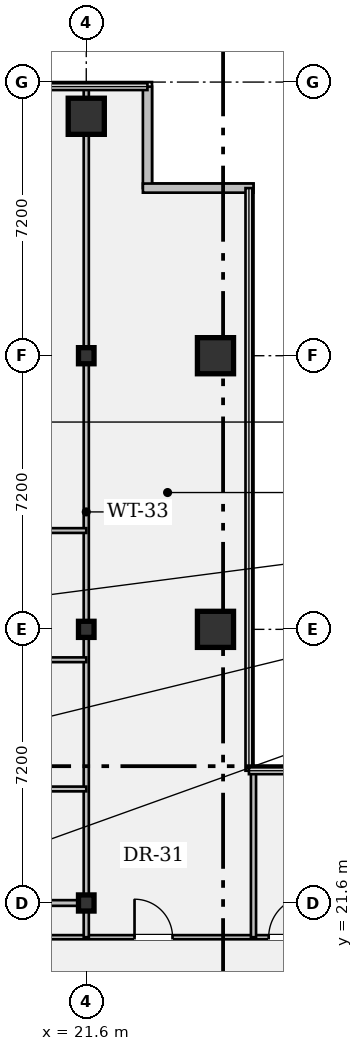
"""IFC4 building model, lengths in metres.
Left out: names, types, materials, properties, quantities, classifications, styles, units other than length and angle.
Written with IfcOpenShell. Run it as: python <this file> out.ifc"""

import sys

from ifc_helpers import new_model, si_unit, direction, frame, frame_2d, origin, origin_2d, place, context, subcontext, project, spatial, rectangle, hollow_rectangle, i_section, extrude, element, fill, save


model = new_model("IFC4")
c1 = context("Model", 3, precision=1e-05, world=origin(), true_north=direction((0.0, 1.0)))
c2 = subcontext(c1, "Body", "Model", "MODEL_VIEW")
j1 = project(units=[si_unit("LENGTHUNIT", "METRE"), si_unit("PLANEANGLEUNIT", "RADIAN")], contexts=[c1])
p1 = place(None, origin())
s1 = spatial("IfcSite", under=j1, at=p1, CompositionType="ELEMENT")
p2 = place(p1, origin())
s2 = spatial("IfcBuilding", under=s1, at=p2, CompositionType="ELEMENT")
p3 = place(p2, frame((0.0, 0.0, 102.2)))
s3 = spatial("IfcBuildingStorey", under=s2, at=p3, CompositionType="ELEMENT", Elevation=102.2)
for number, where, z_axis, x_axis in (
    (1, (21.6, 21.6, 0.0), (0.0, 0.0, 1.0), (1.0, 0.0, 0.0)),
    (2, (21.6, 28.8, 0.0), (0.0, 0.0, 1.0), (1.0, 0.0, 0.0)),
    (3, (21.6, 36.0, 0.0), (0.0, 0.0, 1.0), (1.0, 0.0, 0.0)),
):
    element("IfcColumn", number, at=place(p3, frame(where, z_axis=z_axis, x_axis=x_axis)), inside=s3, PredefinedType="COLUMN", context=c2, shape_type="SweptSolid", body=[
        extrude(i_section(OverallWidth=0.409, OverallDepth=0.424, WebThickness=0.033, FlangeThickness=0.052, FilletRadius=0.018, at=origin_2d()), origin(), (0.0, 0.0, 1.0), 3.58),
    ])
for number, where, z_axis, x_axis in (
    (4, (21.6, 42.3, 0.0), (0.0, 0.0, 1.0), (1.0, 0.0, 0.0)),
    (5, (25.0, 28.8, 0.0), (0.0, 0.0, 1.0), (1.0, 0.0, 0.0)),
    (6, (25.0, 36.0, 0.0), (0.0, 0.0, 1.0), (1.0, 0.0, 0.0)),
):
    element("IfcColumn", number, at=place(p3, frame(where, z_axis=z_axis, x_axis=x_axis)), inside=s3, PredefinedType="COLUMN", context=c2, shape_type="SweptSolid", body=[
        extrude(hollow_rectangle(XDim=0.95, YDim=0.95, WallThickness=0.06, at=origin_2d()), origin(), (0.0, 0.0, 1.0), 3.58),
    ])
p4 = place(p3, frame((23.21, 43.08, 0.0), z_axis=(0.0, 0.0, 1.0), x_axis=(0.0, -1.0, 0.0)))
e7 = element("IfcWall", 7, at=p4, inside=s3, PredefinedType="STANDARD", context=c2, shape_type="SweptSolid", body=[
    extrude(rectangle(XDim=2.67, YDim=0.24, at=frame_2d((1.335, 0.0))), origin(), (0.0, 0.0, 1.0), 3.58),
])
p5 = place(p3, frame((23.09, 40.41, 0.0), z_axis=(0.0, 0.0, 1.0), x_axis=(1.0, 0.0, 0.0)))
e8 = element("IfcWall", 8, at=p5, inside=s3, PredefinedType="STANDARD", context=c2, shape_type="SweptSolid", body=[
    extrude(rectangle(XDim=2.91, YDim=0.24, at=frame_2d((1.455, 0.0))), origin(), (0.0, 0.0, 1.0), 3.58),
])
p6 = place(p3, frame((17.35, 20.7, 0.0), z_axis=(0.0, 0.0, 1.0), x_axis=(1.0, 0.0, 0.0)))
e9 = element("IfcWall", 9, at=p6, inside=s3, PredefinedType="PARTITIONING", context=c2, shape_type="SweptSolid", body=[
    extrude(rectangle(XDim=22.35, YDim=0.11, at=frame_2d((11.175, 0.0))), origin(), (0.0, 0.0, 1.0), 2.793),
])
p7 = place(p6, frame((5.52, 0.0, 0.0)))
e10 = element("IfcOpeningElement", 10, at=p7, cuts=e9, PredefinedType="OPENING", context=c2, shape_type="SweptSolid", body=[
    extrude(rectangle(XDim=1.0, YDim=2.15, at=frame_2d((0.5, 1.075))), frame((0.0, 0.067, 0.0), z_axis=(0.0, -1.0, 0.0), x_axis=(1.0, 0.0, 0.0)), (0.0, 0.0, 1.0), 0.134),
])
p8 = place(p6, frame((9.05, 0.0, 0.0)))
e11 = element("IfcOpeningElement", 11, at=p8, cuts=e9, PredefinedType="OPENING", context=c2, shape_type="SweptSolid", body=[
    extrude(rectangle(XDim=1.08, YDim=2.15, at=frame_2d((0.54, 1.075))), frame((0.0, 0.067, 0.0), z_axis=(0.0, -1.0, 0.0), x_axis=(1.0, 0.0, 0.0)), (0.0, 0.0, 1.0), 0.134),
])
p9 = place(p3, frame((17.35, 21.6, 0.0), z_axis=(0.0, 0.0, 1.0), x_axis=(1.0, 0.0, 0.0)))
e12 = element("IfcWall", 12, at=p9, inside=s3, PredefinedType="PARTITIONING", context=c2, shape_type="SweptSolid", body=[
    extrude(rectangle(XDim=4.25, YDim=0.15, at=frame_2d((2.125, 0.0))), origin(), (0.0, 0.0, 1.0), 2.793),
])
p10 = place(p3, frame((21.6, 20.7, 0.0), z_axis=(0.0, 0.0, 1.0), x_axis=(0.0, 1.0, 0.0)))
e13 = element("IfcWall", 13, at=p10, inside=s3, PredefinedType="PARTITIONING", context=c2, shape_type="SweptSolid", body=[
    extrude(rectangle(XDim=22.38, YDim=0.135, at=frame_2d((11.19, 0.0))), origin(), (0.0, 0.0, 1.0), 2.793),
])
for number, where, z_axis, x_axis in (
    (14, (17.35, 24.6, 0.0), (0.0, 0.0, 1.0), (1.0, 0.0, 0.0)),
    (15, (17.35, 28.0, 0.0), (0.0, 0.0, 1.0), (1.0, 0.0, 0.0)),
    (16, (17.35, 31.4, 0.0), (0.0, 0.0, 1.0), (1.0, 0.0, 0.0)),
):
    element("IfcWall", number, at=place(p3, frame(where, z_axis=z_axis, x_axis=x_axis)), inside=s3, PredefinedType="PARTITIONING", context=c2, shape_type="SweptSolid", body=[
        extrude(rectangle(XDim=4.25, YDim=0.125, at=frame_2d((2.125, 0.0))), origin(), (0.0, 0.0, 1.0), 2.793),
    ])
p11 = place(p3, frame((26.0, 20.7, 0.0), z_axis=(0.0, 0.0, 1.0), x_axis=(0.0, 1.0, 0.0)))
e17 = element("IfcWall", 17, at=p11, inside=s3, PredefinedType="PARTITIONING", context=c2, shape_type="SweptSolid", body=[
    extrude(rectangle(XDim=4.38, YDim=0.135, at=frame_2d((2.19, 0.0))), origin(), (0.0, 0.0, 1.0), 2.793),
])
p12 = place(p7, origin())
e18 = element("IfcDoor", 18, at=p12, inside=s3, OperationType="SINGLE_SWING_LEFT", PredefinedType="DOOR", context=c2, shape_type="SweptSolid", body=[
    extrude(rectangle(XDim=1.0, YDim=2.15, at=frame_2d((0.5, 1.075))), frame((0.0, 0.025, 0.0), z_axis=(0.0, -1.0, 0.0), x_axis=(1.0, 0.0, 0.0)), (0.0, 0.0, 1.0), 0.05),
])
fill(e10, e18)
p13 = place(p8, origin())
e19 = element("IfcDoor", 19, at=p13, inside=s3, OperationType="SINGLE_SWING_RIGHT", PredefinedType="DOOR", context=c2, shape_type="SweptSolid", body=[
    extrude(rectangle(XDim=1.08, YDim=2.15, at=frame_2d((0.54, 1.075))), frame((0.0, 0.025, 0.0), z_axis=(0.0, -1.0, 0.0), x_axis=(1.0, 0.0, 0.0)), (0.0, 0.0, 1.0), 0.05),
])
fill(e11, e19)
save(model, sys.argv[1])
